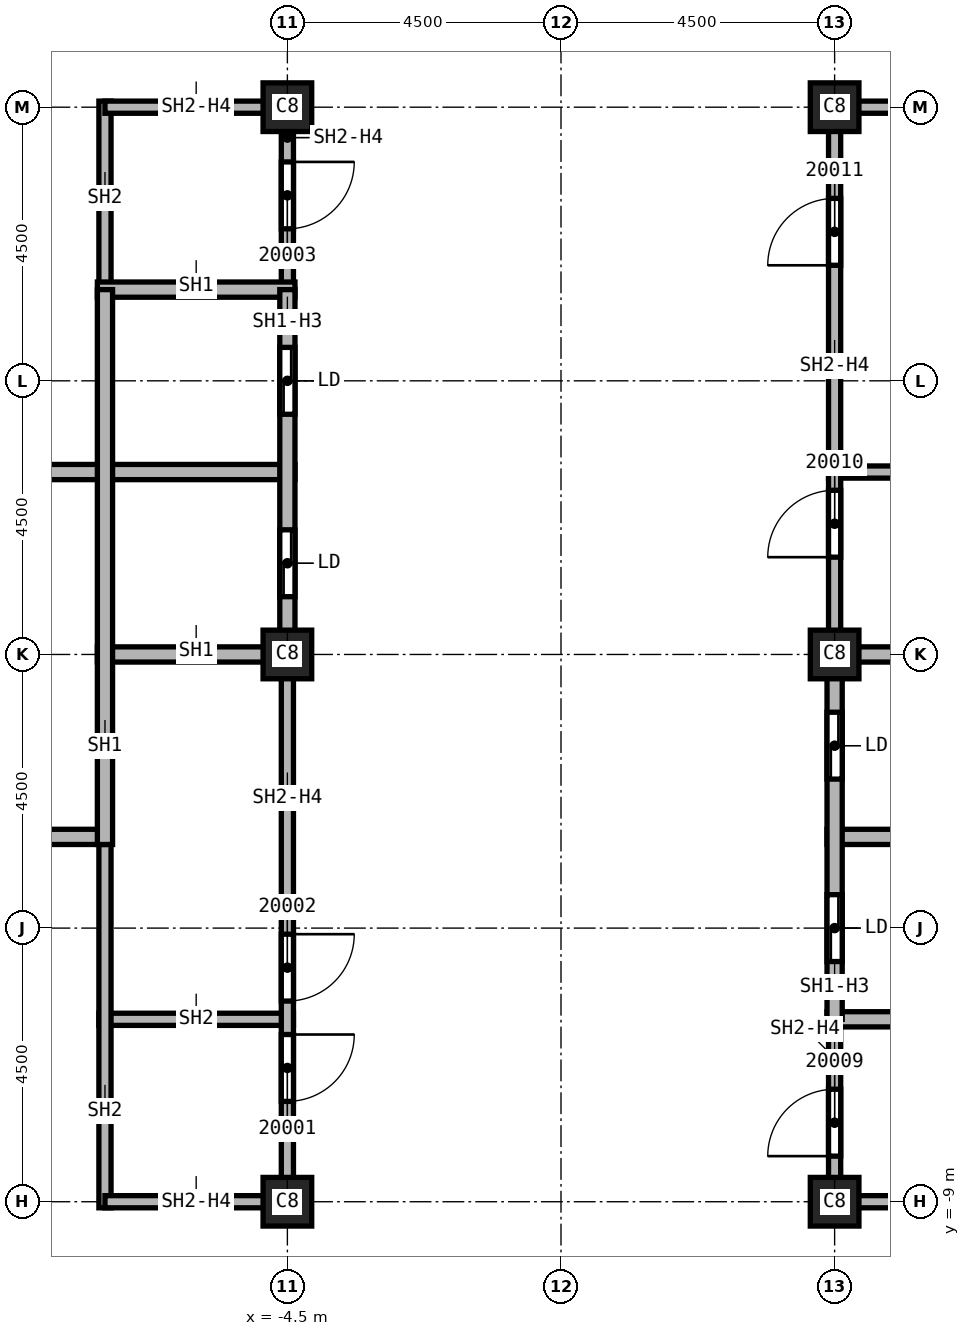
"""IFC4 building model, lengths in metres.
Left out: names, types, materials, properties, quantities, classifications, styles, units other than length and angle.
Written with IfcOpenShell. Run it as: python <this file> out.ifc"""

import sys

from ifc_helpers import new_model, si_unit, direction, frame, frame_2d, origin, origin_2d, place, context, subcontext, project, spatial, rectangle, extrude, element, fill, save


model = new_model("IFC4")
c1 = context("Model", 3, precision=1e-05, world=origin(), true_north=direction((0.0, 1.0)))
c2 = subcontext(c1, "Body", "Model", "MODEL_VIEW")
j1 = project(units=[si_unit("LENGTHUNIT", "METRE"), si_unit("PLANEANGLEUNIT", "RADIAN")], contexts=[c1])
p1 = place(None, origin())
s1 = spatial("IfcSite", under=j1, at=p1, CompositionType="ELEMENT")
p2 = place(p1, origin())
s2 = spatial("IfcBuilding", under=s1, at=p2, CompositionType="ELEMENT")
p3 = place(p2, frame((0.0, 0.0, 286.0)))
s3 = spatial("IfcBuildingStorey", under=s2, at=p3, CompositionType="ELEMENT", Elevation=286.0)
for number, where, z_axis, x_axis in (
    (1, (4.5, 0.0, 0.0), (0.0, 0.0, 1.0), (1.0, 0.0, 0.0)),
    (2, (4.5, 9.0, 0.0), (0.0, 0.0, 1.0), (1.0, 0.0, 0.0)),
    (3, (4.5, -9.0, 0.0), (0.0, 0.0, 1.0), (1.0, 0.0, 0.0)),
    (4, (-4.5, 0.0, 0.0), (0.0, 0.0, 1.0), (1.0, 0.0, 0.0)),
    (5, (-4.5, 9.0, 0.0), (0.0, 0.0, 1.0), (1.0, 0.0, 0.0)),
    (6, (-4.5, -9.0, 0.0), (0.0, 0.0, 1.0), (1.0, 0.0, 0.0)),
):
    element("IfcColumn", number, at=place(p3, frame(where, z_axis=z_axis, x_axis=x_axis)), inside=s3, PredefinedType="COLUMN", context=c2, shape_type="SweptSolid", body=[
        extrude(rectangle(XDim=0.8, YDim=0.8, at=origin_2d()), origin(), (0.0, 0.0, 1.0), 3.72),
    ])
p4 = place(p3, frame((-7.6, -6.0, 0.0), z_axis=(0.0, 0.0, 1.0), x_axis=(1.0, 0.0, 0.0)))
e7 = element("IfcWall", 7, at=p4, inside=s3, PredefinedType="SOLIDWALL", context=c2, shape_type="SweptSolid", body=[
    extrude(rectangle(XDim=3.2, YDim=0.2, at=frame_2d((1.6, 0.0))), origin(), (0.0, 0.0, 1.0), 3.72),
])
p5 = place(p3, frame((-7.5, -9.1, 0.0), z_axis=(0.0, 0.0, 1.0), x_axis=(0.0, 1.0, 0.0)))
e8 = element("IfcWall", 8, at=p5, inside=s3, PredefinedType="SOLIDWALL", context=c2, shape_type="SweptSolid", body=[
    extrude(rectangle(XDim=6.225, YDim=0.2, at=frame_2d((3.113, 0.0))), origin(), (0.0, 0.0, 1.0), 3.72),
])
p6 = place(p3, frame((-7.5, 6.0, 0.0), z_axis=(0.0, 0.0, 1.0), x_axis=(0.0, 1.0, 0.0)))
e9 = element("IfcWall", 9, at=p6, inside=s3, PredefinedType="SOLIDWALL", context=c2, shape_type="SweptSolid", body=[
    extrude(rectangle(XDim=3.1, YDim=0.2, at=frame_2d((1.55, 0.0))), origin(), (0.0, 0.0, 1.0), 3.72),
])
for number, where, z_axis, x_axis in (
    (10, (-7.5, 9.0, 0.0), (0.0, 0.0, 1.0), (1.0, 0.0, 0.0)),
    (11, (-4.5, -9.0, 0.0), (0.0, 0.0, 1.0), (-1.0, 0.0, 0.0)),
):
    element("IfcWall", number, at=place(p3, frame(where, z_axis=z_axis, x_axis=x_axis)), inside=s3, PredefinedType="SOLIDWALL", context=c2, shape_type="SweptSolid", body=[
        extrude(rectangle(XDim=3.0, YDim=0.2, at=frame_2d((1.5, 0.0))), origin(), (0.0, 0.0, 1.0), 3.042),
    ])
p7 = place(p3, frame((-4.5, 0.0, 0.0), z_axis=(0.0, 0.0, 1.0), x_axis=(0.0, -1.0, 0.0)))
e12 = element("IfcWall", 12, at=p7, inside=s3, PredefinedType="SOLIDWALL", context=c2, shape_type="SweptSolid", body=[
    extrude(rectangle(XDim=9.1, YDim=0.2, at=frame_2d((4.55, 0.0))), origin(), (0.0, 0.0, 1.0), 3.042),
])
p8 = place(p7, frame((6.25, 0.0, 0.0)))
e13 = element("IfcOpeningElement", 13, at=p8, cuts=e12, PredefinedType="OPENING", context=c2, shape_type="SweptSolid", body=[
    extrude(rectangle(XDim=1.1, YDim=2.1, at=frame_2d((0.55, 1.05))), frame((0.0, 0.1, 0.0), z_axis=(0.0, -1.0, 0.0), x_axis=(1.0, 0.0, 0.0)), (0.0, 0.0, 1.0), 0.2),
])
p9 = place(p7, frame((4.6, 0.0, 0.0)))
e14 = element("IfcOpeningElement", 14, at=p9, cuts=e12, PredefinedType="OPENING", context=c2, shape_type="SweptSolid", body=[
    extrude(rectangle(XDim=1.1, YDim=2.1, at=frame_2d((0.55, 1.05))), frame((0.0, 0.1, 0.0), z_axis=(0.0, -1.0, 0.0), x_axis=(1.0, 0.0, 0.0)), (0.0, 0.0, 1.0), 0.2),
])
p10 = place(p3, frame((-4.5, 9.1, 0.0), z_axis=(0.0, 0.0, 1.0), x_axis=(0.0, -1.0, 0.0)))
e15 = element("IfcWall", 15, at=p10, inside=s3, PredefinedType="SOLIDWALL", context=c2, shape_type="SweptSolid", body=[
    extrude(rectangle(XDim=3.1, YDim=0.2, at=frame_2d((1.55, 0.0))), origin(), (0.0, 0.0, 1.0), 3.042),
])
p11 = place(p10, frame((1.0, 0.0, 0.0)))
e16 = element("IfcOpeningElement", 16, at=p11, cuts=e15, PredefinedType="OPENING", context=c2, shape_type="SweptSolid", body=[
    extrude(rectangle(XDim=1.1, YDim=2.1, at=frame_2d((0.55, 1.05))), frame((0.0, 0.1, 0.0), z_axis=(0.0, -1.0, 0.0), x_axis=(1.0, 0.0, 0.0)), (0.0, 0.0, 1.0), 0.2),
])
p12 = place(p3, frame((4.4, 3.0, 0.0), z_axis=(0.0, 0.0, 1.0), x_axis=(1.0, 0.0, 0.0)))
e17 = element("IfcWall", 17, at=p12, inside=s3, PredefinedType="SOLIDWALL", context=c2, shape_type="SweptSolid", body=[
    extrude(rectangle(XDim=3.225, YDim=0.2, at=frame_2d((1.613, 0.0))), origin(), (0.0, 0.0, 1.0), 3.72),
])
p13 = place(p3, frame((4.5, -9.1, 0.0), z_axis=(0.0, 0.0, 1.0), x_axis=(0.0, 1.0, 0.0)))
e18 = element("IfcWall", 18, at=p13, inside=s3, PredefinedType="SOLIDWALL", context=c2, shape_type="SweptSolid", body=[
    extrude(rectangle(XDim=3.1, YDim=0.2, at=frame_2d((1.55, 0.0))), origin(), (0.0, 0.0, 1.0), 3.042),
])
p14 = place(p13, frame((0.85, 0.0, 0.0)))
e19 = element("IfcOpeningElement", 19, at=p14, cuts=e18, PredefinedType="OPENING", context=c2, shape_type="SweptSolid", body=[
    extrude(rectangle(XDim=1.1, YDim=2.1, at=frame_2d((0.55, 1.05))), frame((0.0, 0.1, 0.0), z_axis=(0.0, -1.0, 0.0), x_axis=(1.0, 0.0, 0.0)), (0.0, 0.0, 1.0), 0.2),
])
p15 = place(p3, frame((4.5, 0.0, 0.0), z_axis=(0.0, 0.0, 1.0), x_axis=(0.0, 1.0, 0.0)))
e20 = element("IfcWall", 20, at=p15, inside=s3, PredefinedType="SOLIDWALL", context=c2, shape_type="SweptSolid", body=[
    extrude(rectangle(XDim=9.1, YDim=0.2, at=frame_2d((4.55, 0.0))), origin(), (0.0, 0.0, 1.0), 3.042),
])
p16 = place(p15, frame((1.6, 0.0, 0.0)))
e21 = element("IfcOpeningElement", 21, at=p16, cuts=e20, PredefinedType="OPENING", context=c2, shape_type="SweptSolid", body=[
    extrude(rectangle(XDim=1.1, YDim=2.1, at=frame_2d((0.55, 1.05))), frame((0.0, 0.1, 0.0), z_axis=(0.0, -1.0, 0.0), x_axis=(1.0, 0.0, 0.0)), (0.0, 0.0, 1.0), 0.2),
])
p17 = place(p15, frame((6.4, 0.0, 0.0)))
e22 = element("IfcOpeningElement", 22, at=p17, cuts=e20, PredefinedType="OPENING", context=c2, shape_type="SweptSolid", body=[
    extrude(rectangle(XDim=1.1, YDim=2.1, at=frame_2d((0.55, 1.05))), frame((0.0, 0.1, 0.0), z_axis=(0.0, -1.0, 0.0), x_axis=(1.0, 0.0, 0.0)), (0.0, 0.0, 1.0), 0.2),
])
for number, where, z_axis, x_axis in (
    (23, (4.5, 9.0, 0.0), (0.0, 0.0, 1.0), (1.0, 0.0, 0.0)),
    (24, (7.5, -9.0, 0.0), (0.0, 0.0, 1.0), (-1.0, 0.0, 0.0)),
):
    element("IfcWall", number, at=place(p3, frame(where, z_axis=z_axis, x_axis=x_axis)), inside=s3, PredefinedType="SOLIDWALL", context=c2, shape_type="SweptSolid", body=[
        extrude(rectangle(XDim=3.0, YDim=0.2, at=frame_2d((1.5, 0.0))), origin(), (0.0, 0.0, 1.0), 3.042),
    ])
p18 = place(p3, frame((-13.625, 3.0, 0.0), z_axis=(0.0, 0.0, 1.0), x_axis=(1.0, 0.0, 0.0)))
e25 = element("IfcWall", 25, at=p18, inside=s3, PredefinedType="SOLIDWALL", context=c2, shape_type="SweptSolid", body=[
    extrude(rectangle(XDim=9.25, YDim=0.25, at=frame_2d((4.625, 0.0))), origin(), (0.0, 0.0, 1.0), 3.72),
])
p19 = place(p18, frame((3.25, 0.0, 0.0)))
e26 = element("IfcOpeningElement", 26, at=p19, cuts=e25, PredefinedType="OPENING", context=c2, shape_type="SweptSolid", body=[
    extrude(rectangle(XDim=1.1, YDim=2.1, at=frame_2d((0.55, 1.05))), frame((0.0, 0.125, 0.0), z_axis=(0.0, -1.0, 0.0), x_axis=(1.0, 0.0, 0.0)), (0.0, 0.0, 1.0), 0.25),
])
p20 = place(p3, frame((-13.625, -3.0, 0.0), z_axis=(0.0, 0.0, 1.0), x_axis=(1.0, 0.0, 0.0)))
e27 = element("IfcWall", 27, at=p20, inside=s3, PredefinedType="SOLIDWALL", context=c2, shape_type="SweptSolid", body=[
    extrude(rectangle(XDim=6.125, YDim=0.25, at=frame_2d((3.062, 0.0))), origin(), (0.0, 0.0, 1.0), 3.72),
])
p21 = place(p20, frame((3.25, 0.0, 0.0)))
e28 = element("IfcOpeningElement", 28, at=p21, cuts=e27, PredefinedType="OPENING", context=c2, shape_type="SweptSolid", body=[
    extrude(rectangle(XDim=1.1, YDim=2.1, at=frame_2d((0.55, 1.05))), frame((0.0, 0.125, 0.0), z_axis=(0.0, -1.0, 0.0), x_axis=(1.0, 0.0, 0.0)), (0.0, 0.0, 1.0), 0.25),
])
for number, where, z_axis, x_axis in (
    (29, (-7.625, 0.0, 0.0), (0.0, 0.0, 1.0), (1.0, 0.0, 0.0)),
    (30, (-7.625, 6.0, 0.0), (0.0, 0.0, 1.0), (1.0, 0.0, 0.0)),
):
    element("IfcWall", number, at=place(p3, frame(where, z_axis=z_axis, x_axis=x_axis)), inside=s3, PredefinedType="SOLIDWALL", context=c2, shape_type="SweptSolid", body=[
        extrude(rectangle(XDim=3.25, YDim=0.25, at=frame_2d((1.625, 0.0))), origin(), (0.0, 0.0, 1.0), 3.72),
    ])
p22 = place(p3, frame((-7.5, -3.125, 0.0), z_axis=(0.0, 0.0, 1.0), x_axis=(0.0, 1.0, 0.0)))
e31 = element("IfcWall", 31, at=p22, inside=s3, PredefinedType="SOLIDWALL", context=c2, shape_type="SweptSolid", body=[
    extrude(rectangle(XDim=9.125, YDim=0.25, at=frame_2d((4.562, 0.0))), origin(), (0.0, 0.0, 1.0), 3.72),
])
p23 = place(p3, frame((-4.5, 6.0, 0.0), z_axis=(0.0, 0.0, 1.0), x_axis=(0.0, -1.0, 0.0)))
e32 = element("IfcWall", 32, at=p23, inside=s3, PredefinedType="SOLIDWALL", context=c2, shape_type="SweptSolid", body=[
    extrude(rectangle(XDim=6.0, YDim=0.25, at=frame_2d((3.0, 0.0))), origin(), (0.0, 0.0, 1.0), 3.042),
])
p24 = place(p23, frame((3.95, 0.0, 0.0)))
e33 = element("IfcOpeningElement", 33, at=p24, cuts=e32, PredefinedType="OPENING", context=c2, shape_type="SweptSolid", body=[
    extrude(rectangle(XDim=1.1, YDim=2.1, at=frame_2d((0.55, 1.05))), frame((0.0, 0.125, 0.0), z_axis=(0.0, -1.0, 0.0), x_axis=(1.0, 0.0, 0.0)), (0.0, 0.0, 1.0), 0.25),
])
p25 = place(p23, frame((0.95, 0.0, 0.0)))
e34 = element("IfcOpeningElement", 34, at=p25, cuts=e32, PredefinedType="OPENING", context=c2, shape_type="SweptSolid", body=[
    extrude(rectangle(XDim=1.1, YDim=2.1, at=frame_2d((0.55, 1.05))), frame((0.0, 0.125, 0.0), z_axis=(0.0, -1.0, 0.0), x_axis=(1.0, 0.0, 0.0)), (0.0, 0.0, 1.0), 0.25),
])
p26 = place(p3, frame((4.375, -6.0, 0.0), z_axis=(0.0, 0.0, 1.0), x_axis=(1.0, 0.0, 0.0)))
e35 = element("IfcWall", 35, at=p26, inside=s3, PredefinedType="SOLIDWALL", context=c2, shape_type="SweptSolid", body=[
    extrude(rectangle(XDim=3.25, YDim=0.25, at=frame_2d((1.625, 0.0))), origin(), (0.0, 0.0, 1.0), 3.72),
])
p27 = place(p3, frame((4.375, -3.0, 0.0), z_axis=(0.0, 0.0, 1.0), x_axis=(1.0, 0.0, 0.0)))
e36 = element("IfcWall", 36, at=p27, inside=s3, PredefinedType="SOLIDWALL", context=c2, shape_type="SweptSolid", body=[
    extrude(rectangle(XDim=9.25, YDim=0.25, at=frame_2d((4.625, 0.0))), origin(), (0.0, 0.0, 1.0), 3.72),
])
p28 = place(p27, frame((3.375, 0.0, 0.0)))
e37 = element("IfcOpeningElement", 37, at=p28, cuts=e36, PredefinedType="OPENING", context=c2, shape_type="SweptSolid", body=[
    extrude(rectangle(XDim=1.1, YDim=2.1, at=frame_2d((0.55, 1.05))), frame((0.0, 0.125, 0.0), z_axis=(0.0, -1.0, 0.0), x_axis=(1.0, 0.0, 0.0)), (0.0, 0.0, 1.0), 0.25),
])
p29 = place(p3, frame((4.375, 0.0, 0.0), z_axis=(0.0, 0.0, 1.0), x_axis=(1.0, 0.0, 0.0)))
e38 = element("IfcWall", 38, at=p29, inside=s3, PredefinedType="SOLIDWALL", context=c2, shape_type="SweptSolid", body=[
    extrude(rectangle(XDim=3.25, YDim=0.25, at=frame_2d((1.625, 0.0))), origin(), (0.0, 0.0, 1.0), 3.72),
])
p30 = place(p3, frame((4.5, -6.0, 0.0), z_axis=(0.0, 0.0, 1.0), x_axis=(0.0, 1.0, 0.0)))
e39 = element("IfcWall", 39, at=p30, inside=s3, PredefinedType="SOLIDWALL", context=c2, shape_type="SweptSolid", body=[
    extrude(rectangle(XDim=6.0, YDim=0.25, at=frame_2d((3.0, 0.0))), origin(), (0.0, 0.0, 1.0), 3.042),
])
p31 = place(p30, frame((0.95, 0.0, 0.0)))
e40 = element("IfcOpeningElement", 40, at=p31, cuts=e39, PredefinedType="OPENING", context=c2, shape_type="SweptSolid", body=[
    extrude(rectangle(XDim=1.1, YDim=2.1, at=frame_2d((0.55, 1.05))), frame((0.0, 0.125, 0.0), z_axis=(0.0, -1.0, 0.0), x_axis=(1.0, 0.0, 0.0)), (0.0, 0.0, 1.0), 0.25),
])
p32 = place(p30, frame((3.95, 0.0, 0.0)))
e41 = element("IfcOpeningElement", 41, at=p32, cuts=e39, PredefinedType="OPENING", context=c2, shape_type="SweptSolid", body=[
    extrude(rectangle(XDim=1.1, YDim=2.1, at=frame_2d((0.55, 1.05))), frame((0.0, 0.125, 0.0), z_axis=(0.0, -1.0, 0.0), x_axis=(1.0, 0.0, 0.0)), (0.0, 0.0, 1.0), 0.25),
])
p33 = place(p8, origin())
e42 = element("IfcDoor", 42, at=p33, inside=s3, OperationType="SINGLE_SWING_RIGHT", PredefinedType="DOOR", context=c2, shape_type="SweptSolid", body=[
    extrude(rectangle(XDim=1.1, YDim=2.1, at=frame_2d((0.55, 1.05))), frame((0.0, 0.025, 0.0), z_axis=(0.0, -1.0, 0.0), x_axis=(1.0, 0.0, 0.0)), (0.0, 0.0, 1.0), 0.05),
])
fill(e13, e42)
p34 = place(p9, origin())
e43 = element("IfcDoor", 43, at=p34, inside=s3, OperationType="SINGLE_SWING_LEFT", PredefinedType="DOOR", context=c2, shape_type="SweptSolid", body=[
    extrude(rectangle(XDim=1.1, YDim=2.1, at=frame_2d((0.55, 1.05))), frame((0.0, 0.025, 0.0), z_axis=(0.0, -1.0, 0.0), x_axis=(1.0, 0.0, 0.0)), (0.0, 0.0, 1.0), 0.05),
])
fill(e14, e43)
p35 = place(p11, origin())
e44 = element("IfcDoor", 44, at=p35, inside=s3, OperationType="SINGLE_SWING_RIGHT", PredefinedType="DOOR", context=c2, shape_type="SweptSolid", body=[
    extrude(rectangle(XDim=1.1, YDim=2.1, at=frame_2d((0.55, 1.05))), frame((0.0, 0.025, 0.0), z_axis=(0.0, -1.0, 0.0), x_axis=(1.0, 0.0, 0.0)), (0.0, 0.0, 1.0), 0.05),
])
fill(e16, e44)
p36 = place(p14, origin())
e45 = element("IfcDoor", 45, at=p36, inside=s3, OperationType="SINGLE_SWING_RIGHT", PredefinedType="DOOR", context=c2, shape_type="SweptSolid", body=[
    extrude(rectangle(XDim=1.1, YDim=2.1, at=frame_2d((0.55, 1.05))), frame((0.0, 0.025, 0.0), z_axis=(0.0, -1.0, 0.0), x_axis=(1.0, 0.0, 0.0)), (0.0, 0.0, 1.0), 0.05),
])
fill(e19, e45)
p37 = place(p16, origin())
e46 = element("IfcDoor", 46, at=p37, inside=s3, OperationType="SINGLE_SWING_LEFT", PredefinedType="DOOR", context=c2, shape_type="SweptSolid", body=[
    extrude(rectangle(XDim=1.1, YDim=2.1, at=frame_2d((0.55, 1.05))), frame((0.0, 0.025, 0.0), z_axis=(0.0, -1.0, 0.0), x_axis=(1.0, 0.0, 0.0)), (0.0, 0.0, 1.0), 0.05),
])
fill(e21, e46)
p38 = place(p17, origin())
e47 = element("IfcDoor", 47, at=p38, inside=s3, OperationType="SINGLE_SWING_RIGHT", PredefinedType="DOOR", context=c2, shape_type="SweptSolid", body=[
    extrude(rectangle(XDim=1.1, YDim=2.1, at=frame_2d((0.55, 1.05))), frame((0.0, 0.025, 0.0), z_axis=(0.0, -1.0, 0.0), x_axis=(1.0, 0.0, 0.0)), (0.0, 0.0, 1.0), 0.05),
])
fill(e22, e47)
p39 = place(p24, origin())
e48 = element("IfcDoor", 48, at=p39, inside=s3, OperationType="SLIDING_TO_LEFT", PredefinedType="DOOR", context=c2, shape_type="SweptSolid", body=[
    extrude(rectangle(XDim=1.1, YDim=2.1, at=frame_2d((0.55, 1.05))), frame((0.0, 0.025, 0.0), z_axis=(0.0, -1.0, 0.0), x_axis=(1.0, 0.0, 0.0)), (0.0, 0.0, 1.0), 0.05),
])
fill(e33, e48)
p40 = place(p25, origin())
e49 = element("IfcDoor", 49, at=p40, inside=s3, OperationType="SLIDING_TO_LEFT", PredefinedType="DOOR", context=c2, shape_type="SweptSolid", body=[
    extrude(rectangle(XDim=1.1, YDim=2.1, at=frame_2d((0.55, 1.05))), frame((0.0, 0.025, 0.0), z_axis=(0.0, -1.0, 0.0), x_axis=(1.0, 0.0, 0.0)), (0.0, 0.0, 1.0), 0.05),
])
fill(e34, e49)
p41 = place(p31, origin())
e50 = element("IfcDoor", 50, at=p41, inside=s3, OperationType="SLIDING_TO_LEFT", PredefinedType="DOOR", context=c2, shape_type="SweptSolid", body=[
    extrude(rectangle(XDim=1.1, YDim=2.1, at=frame_2d((0.55, 1.05))), frame((0.0, 0.025, 0.0), z_axis=(0.0, -1.0, 0.0), x_axis=(1.0, 0.0, 0.0)), (0.0, 0.0, 1.0), 0.05),
])
fill(e40, e50)
p42 = place(p32, origin())
e51 = element("IfcDoor", 51, at=p42, inside=s3, OperationType="SLIDING_TO_LEFT", PredefinedType="DOOR", context=c2, shape_type="SweptSolid", body=[
    extrude(rectangle(XDim=1.1, YDim=2.1, at=frame_2d((0.55, 1.05))), frame((0.0, 0.025, 0.0), z_axis=(0.0, -1.0, 0.0), x_axis=(1.0, 0.0, 0.0)), (0.0, 0.0, 1.0), 0.05),
])
fill(e41, e51)
save(model, sys.argv[1])
